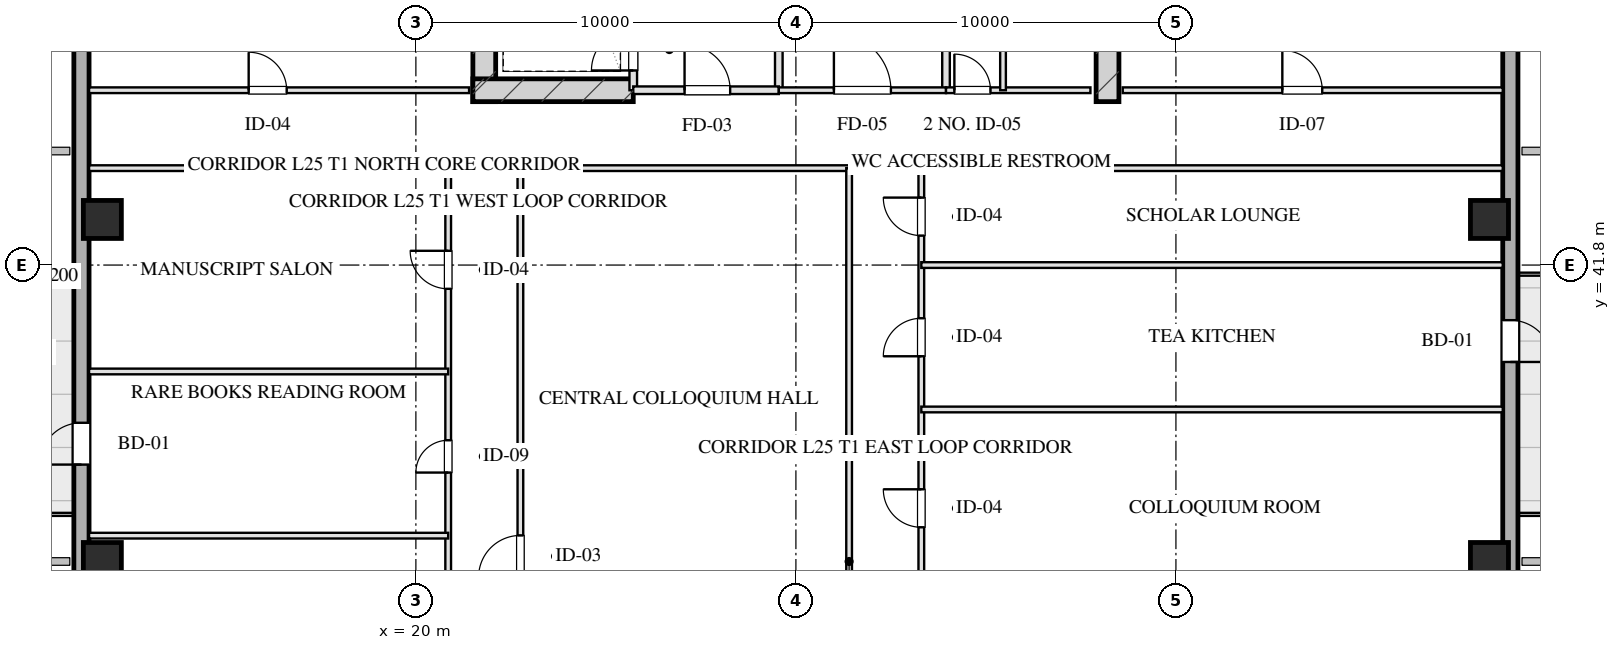
"""IFC4 building model, lengths in metres.
Left out: names, types, materials, properties, quantities, classifications, styles, units other than length and angle.
Written with IfcOpenShell. Run it as: python <this file> out.ifc"""

import sys

from ifc_helpers import new_model, si_unit, direction, frame, frame_2d, origin, origin_2d, place, context, subcontext, project, spatial, rectangle, hollow_rectangle, extrude, element, fill, save


model = new_model("IFC4")
c1 = context("Model", 3, precision=1e-05, world=origin(), true_north=direction((0.0, 1.0)))
c2 = subcontext(c1, "Body", "Model", "MODEL_VIEW")
j1 = project(units=[si_unit("LENGTHUNIT", "METRE"), si_unit("PLANEANGLEUNIT", "RADIAN")], contexts=[c1])
p1 = place(None, origin())
s1 = spatial("IfcSite", under=j1, at=p1, CompositionType="ELEMENT")
p2 = place(p1, origin())
s2 = spatial("IfcBuilding", under=s1, at=p2, CompositionType="ELEMENT")
p3 = place(p2, frame((0.0, 0.0, 100.05)))
s3 = spatial("IfcBuildingStorey", under=s2, at=p3, CompositionType="ELEMENT", Elevation=100.05)
for number, where, z_axis, x_axis in (
    (1, (21.8, 46.1, 0.0), (0.0, 0.0, 1.0), (0.0, 1.0, 0.0)),
    (2, (38.2, 46.1, 0.0), (0.0, 0.0, 1.0), (0.0, 1.0, 0.0)),
):
    element("IfcWall", number, at=place(p3, frame(where, z_axis=z_axis, x_axis=x_axis)), inside=s3, PredefinedType="SHEAR", context=c2, shape_type="SweptSolid", body=[
        extrude(rectangle(XDim=9.48, YDim=0.6, at=frame_2d((4.74, 0.0))), origin(), (0.0, 0.0, 1.0), 3.45),
    ])
p4 = place(p3, frame((21.5, 46.4, 0.0), z_axis=(0.0, 0.0, 1.0), x_axis=(1.0, 0.0, 0.0)))
e3 = element("IfcWall", 3, at=p4, inside=s3, PredefinedType="SHEAR", context=c2, shape_type="SweptSolid", body=[
    extrude(rectangle(XDim=4.22, YDim=0.6, at=frame_2d((2.11, 0.0))), origin(), (0.0, 0.0, 1.0), 3.45),
])
for number, where, z_axis, x_axis in (
    (4, (11.75, 34.0, 0.0), (0.0, 0.0, 1.0), (1.0, 0.0, 0.0)),
    (5, (11.75, 43.0, 0.0), (0.0, 0.0, 1.0), (1.0, 0.0, 0.0)),
    (6, (48.25, 34.0, 0.0), (0.0, 0.0, 1.0), (1.0, 0.0, 0.0)),
    (7, (48.25, 43.0, 0.0), (0.0, 0.0, 1.0), (1.0, 0.0, 0.0)),
):
    element("IfcColumn", number, at=place(p3, frame(where, z_axis=z_axis, x_axis=x_axis)), inside=s3, PredefinedType="COLUMN", context=c2, shape_type="SweptSolid", body=[
        extrude(hollow_rectangle(XDim=1.0, YDim=1.0, WallThickness=0.036, at=origin_2d()), origin(), (0.0, 0.0, 1.0), 3.451),
    ])
p5 = place(p3, frame((11.2, 9.0, 0.0), z_axis=(0.0, 0.0, 1.0), x_axis=(0.0, 1.0, 0.0)))
e8 = element("IfcWall", 8, at=p5, inside=s3, PredefinedType="SOLIDWALL", context=c2, shape_type="SweptSolid", body=[
    extrude(rectangle(XDim=50.0, YDim=0.4, at=frame_2d((25.0, 0.0))), origin(), (0.0, 0.0, 1.0), 2.55),
])
p6 = place(p5, frame((21.2, 0.0, 0.75)))
e9 = element("IfcOpeningElement", 9, at=p6, cuts=e8, PredefinedType="OPENING", context=c2, shape_type="SweptSolid", body=[
    extrude(rectangle(XDim=2.4, YDim=1.4, at=frame_2d((1.2, 0.7))), frame((0.0, 0.21, 0.0), z_axis=(0.0, -1.0, 0.0), x_axis=(1.0, 0.0, 0.0)), (0.0, 0.0, 1.0), 0.42),
])
p7 = place(p5, frame((27.55, 0.0, 0.0)))
e10 = element("IfcOpeningElement", 10, at=p7, cuts=e8, PredefinedType="OPENING", context=c2, shape_type="SweptSolid", body=[
    extrude(rectangle(XDim=1.1, YDim=2.15, at=frame_2d((0.55, 1.075))), frame((0.0, 0.21, 0.0), z_axis=(0.0, -1.0, 0.0), x_axis=(1.0, 0.0, 0.0)), (0.0, 0.0, 1.0), 0.42),
])
p8 = place(p3, frame((48.8, 59.0, 0.0), z_axis=(0.0, 0.0, 1.0), x_axis=(0.0, -1.0, 0.0)))
e11 = element("IfcWall", 11, at=p8, inside=s3, PredefinedType="SOLIDWALL", context=c2, shape_type="SweptSolid", body=[
    extrude(rectangle(XDim=50.0, YDim=0.4, at=frame_2d((25.0, 0.0))), origin(), (0.0, 0.0, 1.0), 2.55),
])
p9 = place(p8, frame((18.65, 0.0, 0.0)))
e12 = element("IfcOpeningElement", 12, at=p9, cuts=e11, PredefinedType="OPENING", context=c2, shape_type="SweptSolid", body=[
    extrude(rectangle(XDim=1.1, YDim=2.15, at=frame_2d((0.55, 1.075))), frame((0.0, 0.21, 0.0), z_axis=(0.0, -1.0, 0.0), x_axis=(1.0, 0.0, 0.0)), (0.0, 0.0, 1.0), 0.42),
])
p10 = place(p3, frame((25.72, 46.4, 0.0), z_axis=(0.0, 0.0, 1.0), x_axis=(0.0, 1.0, 0.0)))
e13 = element("IfcWall", 13, at=p10, inside=s3, PredefinedType="PARTITIONING", context=c2, shape_type="SweptSolid", body=[
    extrude(rectangle(XDim=1.9, YDim=0.2, at=frame_2d((0.95, 0.0))), origin(), (0.0, 0.0, 1.0), 3.155),
])
p11 = place(p10, frame((0.52, 0.0, 0.0)))
e14 = element("IfcOpeningElement", 14, at=p11, cuts=e13, PredefinedType="OPENING", context=c2, shape_type="SweptSolid", body=[
    extrude(rectangle(XDim=1.1, YDim=2.05, at=frame_2d((0.55, 1.025))), frame((0.0, 0.11, 0.0), z_axis=(0.0, -1.0, 0.0), x_axis=(1.0, 0.0, 0.0)), (0.0, 0.0, 1.0), 0.22),
])
p12 = place(p3, frame((29.55, 46.4, 0.0), z_axis=(0.0, 0.0, 1.0), x_axis=(0.0, 1.0, 0.0)))
e15 = element("IfcWall", 15, at=p12, inside=s3, PredefinedType="PARTITIONING", context=c2, shape_type="SweptSolid", body=[
    extrude(rectangle(XDim=8.43, YDim=0.2, at=frame_2d((4.215, 0.0))), origin(), (0.0, 0.0, 1.0), 3.155),
])
p13 = place(p3, frame((25.72, 46.4, 0.0), z_axis=(0.0, 0.0, 1.0), x_axis=(1.0, 0.0, 0.0)))
e16 = element("IfcWall", 16, at=p13, inside=s3, PredefinedType="PARTITIONING", context=c2, shape_type="SweptSolid", body=[
    extrude(rectangle(XDim=3.83, YDim=0.2, at=frame_2d((1.915, 0.0))), origin(), (0.0, 0.0, 1.0), 3.155),
])
p14 = place(p13, frame((1.35, 0.0, 0.0)))
e17 = element("IfcOpeningElement", 17, at=p14, cuts=e16, PredefinedType="OPENING", context=c2, shape_type="SweptSolid", body=[
    extrude(rectangle(XDim=1.2, YDim=2.05, at=frame_2d((0.6, 1.025))), frame((0.0, 0.11, 0.0), z_axis=(0.0, -1.0, 0.0), x_axis=(1.0, 0.0, 0.0)), (0.0, 0.0, 1.0), 0.22),
])
p15 = place(p3, frame((33.95, 46.4, 0.0), z_axis=(0.0, 0.0, 1.0), x_axis=(0.0, 1.0, 0.0)))
e18 = element("IfcWall", 18, at=p15, inside=s3, PredefinedType="PARTITIONING", context=c2, shape_type="SweptSolid", body=[
    extrude(rectangle(XDim=8.43, YDim=0.2, at=frame_2d((4.215, 0.0))), origin(), (0.0, 0.0, 1.0), 3.155),
])
p16 = place(p3, frame((29.55, 46.4, 0.0), z_axis=(0.0, 0.0, 1.0), x_axis=(1.0, 0.0, 0.0)))
e19 = element("IfcWall", 19, at=p16, inside=s3, PredefinedType="PARTITIONING", context=c2, shape_type="SweptSolid", body=[
    extrude(rectangle(XDim=4.4, YDim=0.15, at=frame_2d((2.2, 0.0))), origin(), (0.0, 0.0, 1.0), 3.155),
])
p17 = place(p16, frame((1.45, 0.0, 0.0)))
e20 = element("IfcOpeningElement", 20, at=p17, cuts=e19, PredefinedType="OPENING", context=c2, shape_type="SweptSolid", body=[
    extrude(rectangle(XDim=1.5, YDim=2.05, at=frame_2d((0.75, 1.025))), frame((0.0, 0.085, 0.0), z_axis=(0.0, -1.0, 0.0), x_axis=(1.0, 0.0, 0.0)), (0.0, 0.0, 1.0), 0.17),
])
p18 = place(p3, frame((33.95, 46.4, 0.0), z_axis=(0.0, 0.0, 1.0), x_axis=(1.0, 0.0, 0.0)))
e21 = element("IfcWall", 21, at=p18, inside=s3, PredefinedType="PARTITIONING", context=c2, shape_type="SweptSolid", body=[
    extrude(rectangle(XDim=3.8, YDim=0.15, at=frame_2d((1.9, 0.0))), origin(), (0.0, 0.0, 1.0), 3.155),
])
p19 = place(p18, frame((0.22, 0.0, 0.0)))
e22 = element("IfcOpeningElement", 22, at=p19, cuts=e21, PredefinedType="OPENING", context=c2, shape_type="SweptSolid", body=[
    extrude(rectangle(XDim=0.95, YDim=2.05, at=frame_2d((0.475, 1.025))), frame((0.0, 0.085, 0.0), z_axis=(0.0, -1.0, 0.0), x_axis=(1.0, 0.0, 0.0)), (0.0, 0.0, 1.0), 0.17),
])
p20 = place(p3, frame((35.45, 46.4, 0.0), z_axis=(0.0, 0.0, 1.0), x_axis=(0.0, 1.0, 0.0)))
e23 = element("IfcWall", 23, at=p20, inside=s3, PredefinedType="PARTITIONING", context=c2, shape_type="SweptSolid", body=[
    extrude(rectangle(XDim=8.43, YDim=0.15, at=frame_2d((4.215, 0.0))), origin(), (0.0, 0.0, 1.0), 2.815),
])
p21 = place(p20, frame((2.55, 0.0, 0.0)))
e24 = element("IfcOpeningElement", 24, at=p21, cuts=e23, PredefinedType="OPENING", context=c2, shape_type="SweptSolid", body=[
    extrude(rectangle(XDim=0.95, YDim=2.05, at=frame_2d((0.475, 1.025))), frame((0.0, 0.085, 0.0), z_axis=(0.0, -1.0, 0.0), x_axis=(1.0, 0.0, 0.0)), (0.0, 0.0, 1.0), 0.17),
])
p22 = place(p20, frame((5.8, 0.0, 0.0)))
e25 = element("IfcOpeningElement", 25, at=p22, cuts=e23, PredefinedType="OPENING", context=c2, shape_type="SweptSolid", body=[
    extrude(rectangle(XDim=0.9, YDim=2.05, at=frame_2d((0.45, 1.025))), frame((0.0, 0.085, 0.0), z_axis=(0.0, -1.0, 0.0), x_axis=(1.0, 0.0, 0.0)), (0.0, 0.0, 1.0), 0.17),
])
p23 = place(p3, frame((11.4, 46.4, 0.0), z_axis=(0.0, 0.0, 1.0), x_axis=(1.0, 0.0, 0.0)))
e26 = element("IfcWall", 26, at=p23, inside=s3, PredefinedType="PARTITIONING", context=c2, shape_type="SweptSolid", body=[
    extrude(rectangle(XDim=10.0, YDim=0.15, at=frame_2d((5.0, 0.0))), origin(), (0.0, 0.0, 1.0), 3.155),
])
p24 = place(p23, frame((4.2, 0.0, 0.0)))
e27 = element("IfcOpeningElement", 27, at=p24, cuts=e26, PredefinedType="OPENING", context=c2, shape_type="SweptSolid", body=[
    extrude(rectangle(XDim=1.0, YDim=2.05, at=frame_2d((0.5, 1.025))), frame((0.0, 0.085, 0.0), z_axis=(0.0, -1.0, 0.0), x_axis=(1.0, 0.0, 0.0)), (0.0, 0.0, 1.0), 0.17),
])
p25 = place(p3, frame((38.6, 46.4, 0.0), z_axis=(0.0, 0.0, 1.0), x_axis=(1.0, 0.0, 0.0)))
e28 = element("IfcWall", 28, at=p25, inside=s3, PredefinedType="PARTITIONING", context=c2, shape_type="SweptSolid", body=[
    extrude(rectangle(XDim=10.0, YDim=0.15, at=frame_2d((5.0, 0.0))), origin(), (0.0, 0.0, 1.0), 3.155),
])
p26 = place(p25, frame((4.2, 0.0, 0.0)))
e29 = element("IfcOpeningElement", 29, at=p26, cuts=e28, PredefinedType="OPENING", context=c2, shape_type="SweptSolid", body=[
    extrude(rectangle(XDim=1.05, YDim=2.05, at=frame_2d((0.525, 1.025))), frame((0.0, 0.085, 0.0), z_axis=(0.0, -1.0, 0.0), x_axis=(1.0, 0.0, 0.0)), (0.0, 0.0, 1.0), 0.17),
])
p27 = place(p3, frame((11.4, 44.35, 0.0), z_axis=(0.0, 0.0, 1.0), x_axis=(1.0, 0.0, 0.0)))
e30 = element("IfcWall", 30, at=p27, inside=s3, PredefinedType="PARTITIONING", context=c2, shape_type="SweptSolid", body=[
    extrude(rectangle(XDim=9.45, YDim=0.15, at=frame_2d((4.725, 0.0))), origin(), (0.0, 0.0, 1.0), 3.155),
])
p28 = place(p3, frame((22.75, 44.35, 0.0), z_axis=(0.0, 0.0, 1.0), x_axis=(1.0, 0.0, 0.0)))
e31 = element("IfcWall", 31, at=p28, inside=s3, PredefinedType="PARTITIONING", context=c2, shape_type="SweptSolid", body=[
    extrude(rectangle(XDim=8.65, YDim=0.15, at=frame_2d((4.325, 0.0))), origin(), (0.0, 0.0, 1.0), 3.155),
])
p29 = place(p3, frame((33.3, 44.35, 0.0), z_axis=(0.0, 0.0, 1.0), x_axis=(1.0, 0.0, 0.0)))
e32 = element("IfcWall", 32, at=p29, inside=s3, PredefinedType="PARTITIONING", context=c2, shape_type="SweptSolid", body=[
    extrude(rectangle(XDim=15.3, YDim=0.15, at=frame_2d((7.65, 0.0))), origin(), (0.0, 0.0, 1.0), 3.155),
])
p30 = place(p3, frame((20.85, 23.65, 0.0), z_axis=(0.0, 0.0, 1.0), x_axis=(0.0, 1.0, 0.0)))
e33 = element("IfcWall", 33, at=p30, inside=s3, PredefinedType="PARTITIONING", context=c2, shape_type="SweptSolid", body=[
    extrude(rectangle(XDim=20.7, YDim=0.15, at=frame_2d((10.35, 0.0))), origin(), (0.0, 0.0, 1.0), 3.155),
])
p31 = place(p30, frame((2.175, 0.0, 0.0)))
e34 = element("IfcOpeningElement", 34, at=p31, cuts=e33, PredefinedType="OPENING", context=c2, shape_type="SweptSolid", body=[
    extrude(rectangle(XDim=1.0, YDim=2.05, at=frame_2d((0.5, 1.025))), frame((0.0, 0.085, 0.0), z_axis=(0.0, -1.0, 0.0), x_axis=(1.0, 0.0, 0.0)), (0.0, 0.0, 1.0), 0.17),
])
p32 = place(p30, frame((7.69, 0.0, 0.0)))
e35 = element("IfcOpeningElement", 35, at=p32, cuts=e33, PredefinedType="OPENING", context=c2, shape_type="SweptSolid", body=[
    extrude(rectangle(XDim=1.0, YDim=2.05, at=frame_2d((0.5, 1.025))), frame((0.0, 0.085, 0.0), z_axis=(0.0, -1.0, 0.0), x_axis=(1.0, 0.0, 0.0)), (0.0, 0.0, 1.0), 0.17),
])
p33 = place(p30, frame((12.69, 0.0, 0.0)))
e36 = element("IfcOpeningElement", 36, at=p33, cuts=e33, PredefinedType="OPENING", context=c2, shape_type="SweptSolid", body=[
    extrude(rectangle(XDim=0.85, YDim=2.05, at=frame_2d((0.425, 1.025))), frame((0.0, 0.085, 0.0), z_axis=(0.0, -1.0, 0.0), x_axis=(1.0, 0.0, 0.0)), (0.0, 0.0, 1.0), 0.17),
])
p34 = place(p30, frame((17.525, 0.0, 0.0)))
e37 = element("IfcOpeningElement", 37, at=p34, cuts=e33, PredefinedType="OPENING", context=c2, shape_type="SweptSolid", body=[
    extrude(rectangle(XDim=1.0, YDim=2.05, at=frame_2d((0.5, 1.025))), frame((0.0, 0.085, 0.0), z_axis=(0.0, -1.0, 0.0), x_axis=(1.0, 0.0, 0.0)), (0.0, 0.0, 1.0), 0.17),
])
p35 = place(p3, frame((22.75, 23.65, 0.0), z_axis=(0.0, 0.0, 1.0), x_axis=(0.0, 1.0, 0.0)))
e38 = element("IfcWall", 38, at=p35, inside=s3, PredefinedType="PARTITIONING", context=c2, shape_type="SweptSolid", body=[
    extrude(rectangle(XDim=20.7, YDim=0.15, at=frame_2d((10.35, 0.0))), origin(), (0.0, 0.0, 1.0), 3.155),
])
p36 = place(p35, frame((9.936, 0.0, 0.0)))
e39 = element("IfcOpeningElement", 39, at=p36, cuts=e38, PredefinedType="OPENING", context=c2, shape_type="SweptSolid", body=[
    extrude(rectangle(XDim=1.1, YDim=2.05, at=frame_2d((0.55, 1.025))), frame((0.0, 0.085, 0.0), z_axis=(0.0, -1.0, 0.0), x_axis=(1.0, 0.0, 0.0)), (0.0, 0.0, 1.0), 0.17),
])
p37 = place(p3, frame((31.4, 23.65, 0.0), z_axis=(0.0, 0.0, 1.0), x_axis=(0.0, 1.0, 0.0)))
e40 = element("IfcWall", 40, at=p37, inside=s3, PredefinedType="PARTITIONING", context=c2, shape_type="SweptSolid", body=[
    extrude(rectangle(XDim=20.7, YDim=0.15, at=frame_2d((10.35, 0.0))), origin(), (0.0, 0.0, 1.0), 3.155),
])
p38 = place(p3, frame((33.3, 23.65, 0.0), z_axis=(0.0, 0.0, 1.0), x_axis=(0.0, 1.0, 0.0)))
e41 = element("IfcWall", 41, at=p38, inside=s3, PredefinedType="PARTITIONING", context=c2, shape_type="SweptSolid", body=[
    extrude(rectangle(XDim=20.7, YDim=0.15, at=frame_2d((10.35, 0.0))), origin(), (0.0, 0.0, 1.0), 3.155),
])
p39 = place(p38, frame((2.175, 0.0, 0.0)))
e42 = element("IfcOpeningElement", 42, at=p39, cuts=e41, PredefinedType="OPENING", context=c2, shape_type="SweptSolid", body=[
    extrude(rectangle(XDim=1.0, YDim=2.05, at=frame_2d((0.5, 1.025))), frame((0.0, 0.085, 0.0), z_axis=(0.0, -1.0, 0.0), x_axis=(1.0, 0.0, 0.0)), (0.0, 0.0, 1.0), 0.17),
])
p40 = place(p38, frame((6.75, 0.0, 0.0)))
e43 = element("IfcOpeningElement", 43, at=p40, cuts=e41, PredefinedType="OPENING", context=c2, shape_type="SweptSolid", body=[
    extrude(rectangle(XDim=1.05, YDim=2.05, at=frame_2d((0.525, 1.025))), frame((0.0, 0.085, 0.0), z_axis=(0.0, -1.0, 0.0), x_axis=(1.0, 0.0, 0.0)), (0.0, 0.0, 1.0), 0.17),
])
p41 = place(p38, frame((11.25, 0.0, 0.0)))
e44 = element("IfcOpeningElement", 44, at=p41, cuts=e41, PredefinedType="OPENING", context=c2, shape_type="SweptSolid", body=[
    extrude(rectangle(XDim=1.0, YDim=2.05, at=frame_2d((0.5, 1.025))), frame((0.0, 0.085, 0.0), z_axis=(0.0, -1.0, 0.0), x_axis=(1.0, 0.0, 0.0)), (0.0, 0.0, 1.0), 0.17),
])
p42 = place(p38, frame((15.75, 0.0, 0.0)))
e45 = element("IfcOpeningElement", 45, at=p42, cuts=e41, PredefinedType="OPENING", context=c2, shape_type="SweptSolid", body=[
    extrude(rectangle(XDim=1.0, YDim=2.05, at=frame_2d((0.5, 1.025))), frame((0.0, 0.085, 0.0), z_axis=(0.0, -1.0, 0.0), x_axis=(1.0, 0.0, 0.0)), (0.0, 0.0, 1.0), 0.17),
])
p43 = place(p38, frame((18.925, 0.0, 0.0)))
e46 = element("IfcOpeningElement", 46, at=p43, cuts=e41, PredefinedType="OPENING", context=c2, shape_type="SweptSolid", body=[
    extrude(rectangle(XDim=1.0, YDim=2.05, at=frame_2d((0.5, 1.025))), frame((0.0, 0.085, 0.0), z_axis=(0.0, -1.0, 0.0), x_axis=(1.0, 0.0, 0.0)), (0.0, 0.0, 1.0), 0.17),
])
for number, where, z_axis, x_axis in (
    (47, (11.4, 34.68, 0.0), (0.0, 0.0, 1.0), (1.0, 0.0, 0.0)),
    (48, (11.4, 39.0, 0.0), (0.0, 0.0, 1.0), (1.0, 0.0, 0.0)),
):
    element("IfcWall", number, at=place(p3, frame(where, z_axis=z_axis, x_axis=x_axis)), inside=s3, PredefinedType="PARTITIONING", context=c2, shape_type="SweptSolid", body=[
        extrude(rectangle(XDim=9.45, YDim=0.15, at=frame_2d((4.725, 0.0))), origin(), (0.0, 0.0, 1.0), 3.155),
    ])
for number, where, z_axis, x_axis in (
    (49, (33.3, 38.0, 0.0), (0.0, 0.0, 1.0), (1.0, 0.0, 0.0)),
    (50, (33.3, 41.8, 0.0), (0.0, 0.0, 1.0), (1.0, 0.0, 0.0)),
):
    element("IfcWall", number, at=place(p3, frame(where, z_axis=z_axis, x_axis=x_axis)), inside=s3, PredefinedType="PARTITIONING", context=c2, shape_type="SweptSolid", body=[
        extrude(rectangle(XDim=15.3, YDim=0.15, at=frame_2d((7.65, 0.0))), origin(), (0.0, 0.0, 1.0), 3.155),
    ])
p44 = place(p7, origin())
e51 = element("IfcDoor", 51, at=p44, inside=s3, OperationType="SINGLE_SWING_LEFT", PredefinedType="DOOR", context=c2, shape_type="SweptSolid", body=[
    extrude(rectangle(XDim=1.1, YDim=2.15, at=frame_2d((0.55, 1.075))), frame((0.0, 0.025, 0.0), z_axis=(0.0, -1.0, 0.0), x_axis=(1.0, 0.0, 0.0)), (0.0, 0.0, 1.0), 0.05),
])
fill(e10, e51)
p45 = place(p9, origin())
e52 = element("IfcDoor", 52, at=p45, inside=s3, OperationType="SINGLE_SWING_RIGHT", PredefinedType="DOOR", context=c2, shape_type="SweptSolid", body=[
    extrude(rectangle(XDim=1.1, YDim=2.15, at=frame_2d((0.55, 1.075))), frame((0.0, 0.025, 0.0), z_axis=(0.0, -1.0, 0.0), x_axis=(1.0, 0.0, 0.0)), (0.0, 0.0, 1.0), 0.05),
])
fill(e12, e52)
p46 = place(p11, origin())
e53 = element("IfcDoor", 53, at=p46, inside=s3, OperationType="SINGLE_SWING_LEFT", PredefinedType="DOOR", context=c2, shape_type="SweptSolid", body=[
    extrude(rectangle(XDim=1.1, YDim=2.05, at=frame_2d((0.55, 1.025))), frame((0.0, 0.025, 0.0), z_axis=(0.0, -1.0, 0.0), x_axis=(1.0, 0.0, 0.0)), (0.0, 0.0, 1.0), 0.05),
])
fill(e14, e53)
p47 = place(p14, origin())
e54 = element("IfcDoor", 54, at=p47, inside=s3, OperationType="SINGLE_SWING_LEFT", PredefinedType="DOOR", context=c2, shape_type="SweptSolid", body=[
    extrude(rectangle(XDim=1.2, YDim=2.05, at=frame_2d((0.6, 1.025))), frame((0.0, 0.025, 0.0), z_axis=(0.0, -1.0, 0.0), x_axis=(1.0, 0.0, 0.0)), (0.0, 0.0, 1.0), 0.05),
])
fill(e17, e54)
p48 = place(p17, origin())
e55 = element("IfcDoor", 55, at=p48, inside=s3, OperationType="SINGLE_SWING_LEFT", PredefinedType="DOOR", context=c2, shape_type="SweptSolid", body=[
    extrude(rectangle(XDim=1.5, YDim=2.05, at=frame_2d((0.75, 1.025))), frame((0.0, 0.025, 0.0), z_axis=(0.0, -1.0, 0.0), x_axis=(1.0, 0.0, 0.0)), (0.0, 0.0, 1.0), 0.05),
])
fill(e20, e55)
p49 = place(p19, origin())
e56 = element("IfcDoor", 56, at=p49, inside=s3, OperationType="SINGLE_SWING_LEFT", PredefinedType="DOOR", context=c2, shape_type="SweptSolid", body=[
    extrude(rectangle(XDim=0.95, YDim=2.05, at=frame_2d((0.475, 1.025))), frame((0.0, 0.025, 0.0), z_axis=(0.0, -1.0, 0.0), x_axis=(1.0, 0.0, 0.0)), (0.0, 0.0, 1.0), 0.05),
])
fill(e22, e56)
p50 = place(p24, origin())
e57 = element("IfcDoor", 57, at=p50, inside=s3, OperationType="SINGLE_SWING_LEFT", PredefinedType="DOOR", context=c2, shape_type="SweptSolid", body=[
    extrude(rectangle(XDim=1.0, YDim=2.05, at=frame_2d((0.5, 1.025))), frame((0.0, 0.025, 0.0), z_axis=(0.0, -1.0, 0.0), x_axis=(1.0, 0.0, 0.0)), (0.0, 0.0, 1.0), 0.05),
])
fill(e27, e57)
p51 = place(p26, origin())
e58 = element("IfcDoor", 58, at=p51, inside=s3, OperationType="SINGLE_SWING_LEFT", PredefinedType="DOOR", context=c2, shape_type="SweptSolid", body=[
    extrude(rectangle(XDim=1.05, YDim=2.05, at=frame_2d((0.525, 1.025))), frame((0.0, 0.025, 0.0), z_axis=(0.0, -1.0, 0.0), x_axis=(1.0, 0.0, 0.0)), (0.0, 0.0, 1.0), 0.05),
])
fill(e29, e58)
p52 = place(p33, origin())
e59 = element("IfcDoor", 59, at=p52, inside=s3, OperationType="SINGLE_SWING_LEFT", PredefinedType="DOOR", context=c2, shape_type="SweptSolid", body=[
    extrude(rectangle(XDim=0.85, YDim=2.05, at=frame_2d((0.425, 1.025))), frame((0.0, 0.025, 0.0), z_axis=(0.0, -1.0, 0.0), x_axis=(1.0, 0.0, 0.0)), (0.0, 0.0, 1.0), 0.05),
])
fill(e36, e59)
p53 = place(p34, origin())
e60 = element("IfcDoor", 60, at=p53, inside=s3, OperationType="SINGLE_SWING_RIGHT", PredefinedType="DOOR", context=c2, shape_type="SweptSolid", body=[
    extrude(rectangle(XDim=1.0, YDim=2.05, at=frame_2d((0.5, 1.025))), frame((0.0, 0.025, 0.0), z_axis=(0.0, -1.0, 0.0), x_axis=(1.0, 0.0, 0.0)), (0.0, 0.0, 1.0), 0.05),
])
fill(e37, e60)
p54 = place(p36, origin())
e61 = element("IfcDoor", 61, at=p54, inside=s3, OperationType="SINGLE_SWING_LEFT", PredefinedType="DOOR", context=c2, shape_type="SweptSolid", body=[
    extrude(rectangle(XDim=1.1, YDim=2.05, at=frame_2d((0.55, 1.025))), frame((0.0, 0.025, 0.0), z_axis=(0.0, -1.0, 0.0), x_axis=(1.0, 0.0, 0.0)), (0.0, 0.0, 1.0), 0.05),
])
fill(e39, e61)
p55 = place(p41, origin())
e62 = element("IfcDoor", 62, at=p55, inside=s3, OperationType="SINGLE_SWING_RIGHT", PredefinedType="DOOR", context=c2, shape_type="SweptSolid", body=[
    extrude(rectangle(XDim=1.0, YDim=2.05, at=frame_2d((0.5, 1.025))), frame((0.0, 0.025, 0.0), z_axis=(0.0, -1.0, 0.0), x_axis=(1.0, 0.0, 0.0)), (0.0, 0.0, 1.0), 0.05),
])
fill(e44, e62)
p56 = place(p42, origin())
e63 = element("IfcDoor", 63, at=p56, inside=s3, OperationType="SINGLE_SWING_LEFT", PredefinedType="DOOR", context=c2, shape_type="SweptSolid", body=[
    extrude(rectangle(XDim=1.0, YDim=2.05, at=frame_2d((0.5, 1.025))), frame((0.0, 0.025, 0.0), z_axis=(0.0, -1.0, 0.0), x_axis=(1.0, 0.0, 0.0)), (0.0, 0.0, 1.0), 0.05),
])
fill(e45, e63)
p57 = place(p43, origin())
e64 = element("IfcDoor", 64, at=p57, inside=s3, OperationType="SINGLE_SWING_RIGHT", PredefinedType="DOOR", context=c2, shape_type="SweptSolid", body=[
    extrude(rectangle(XDim=1.0, YDim=2.05, at=frame_2d((0.5, 1.025))), frame((0.0, 0.025, 0.0), z_axis=(0.0, -1.0, 0.0), x_axis=(1.0, 0.0, 0.0)), (0.0, 0.0, 1.0), 0.05),
])
fill(e46, e64)
save(model, sys.argv[1])
